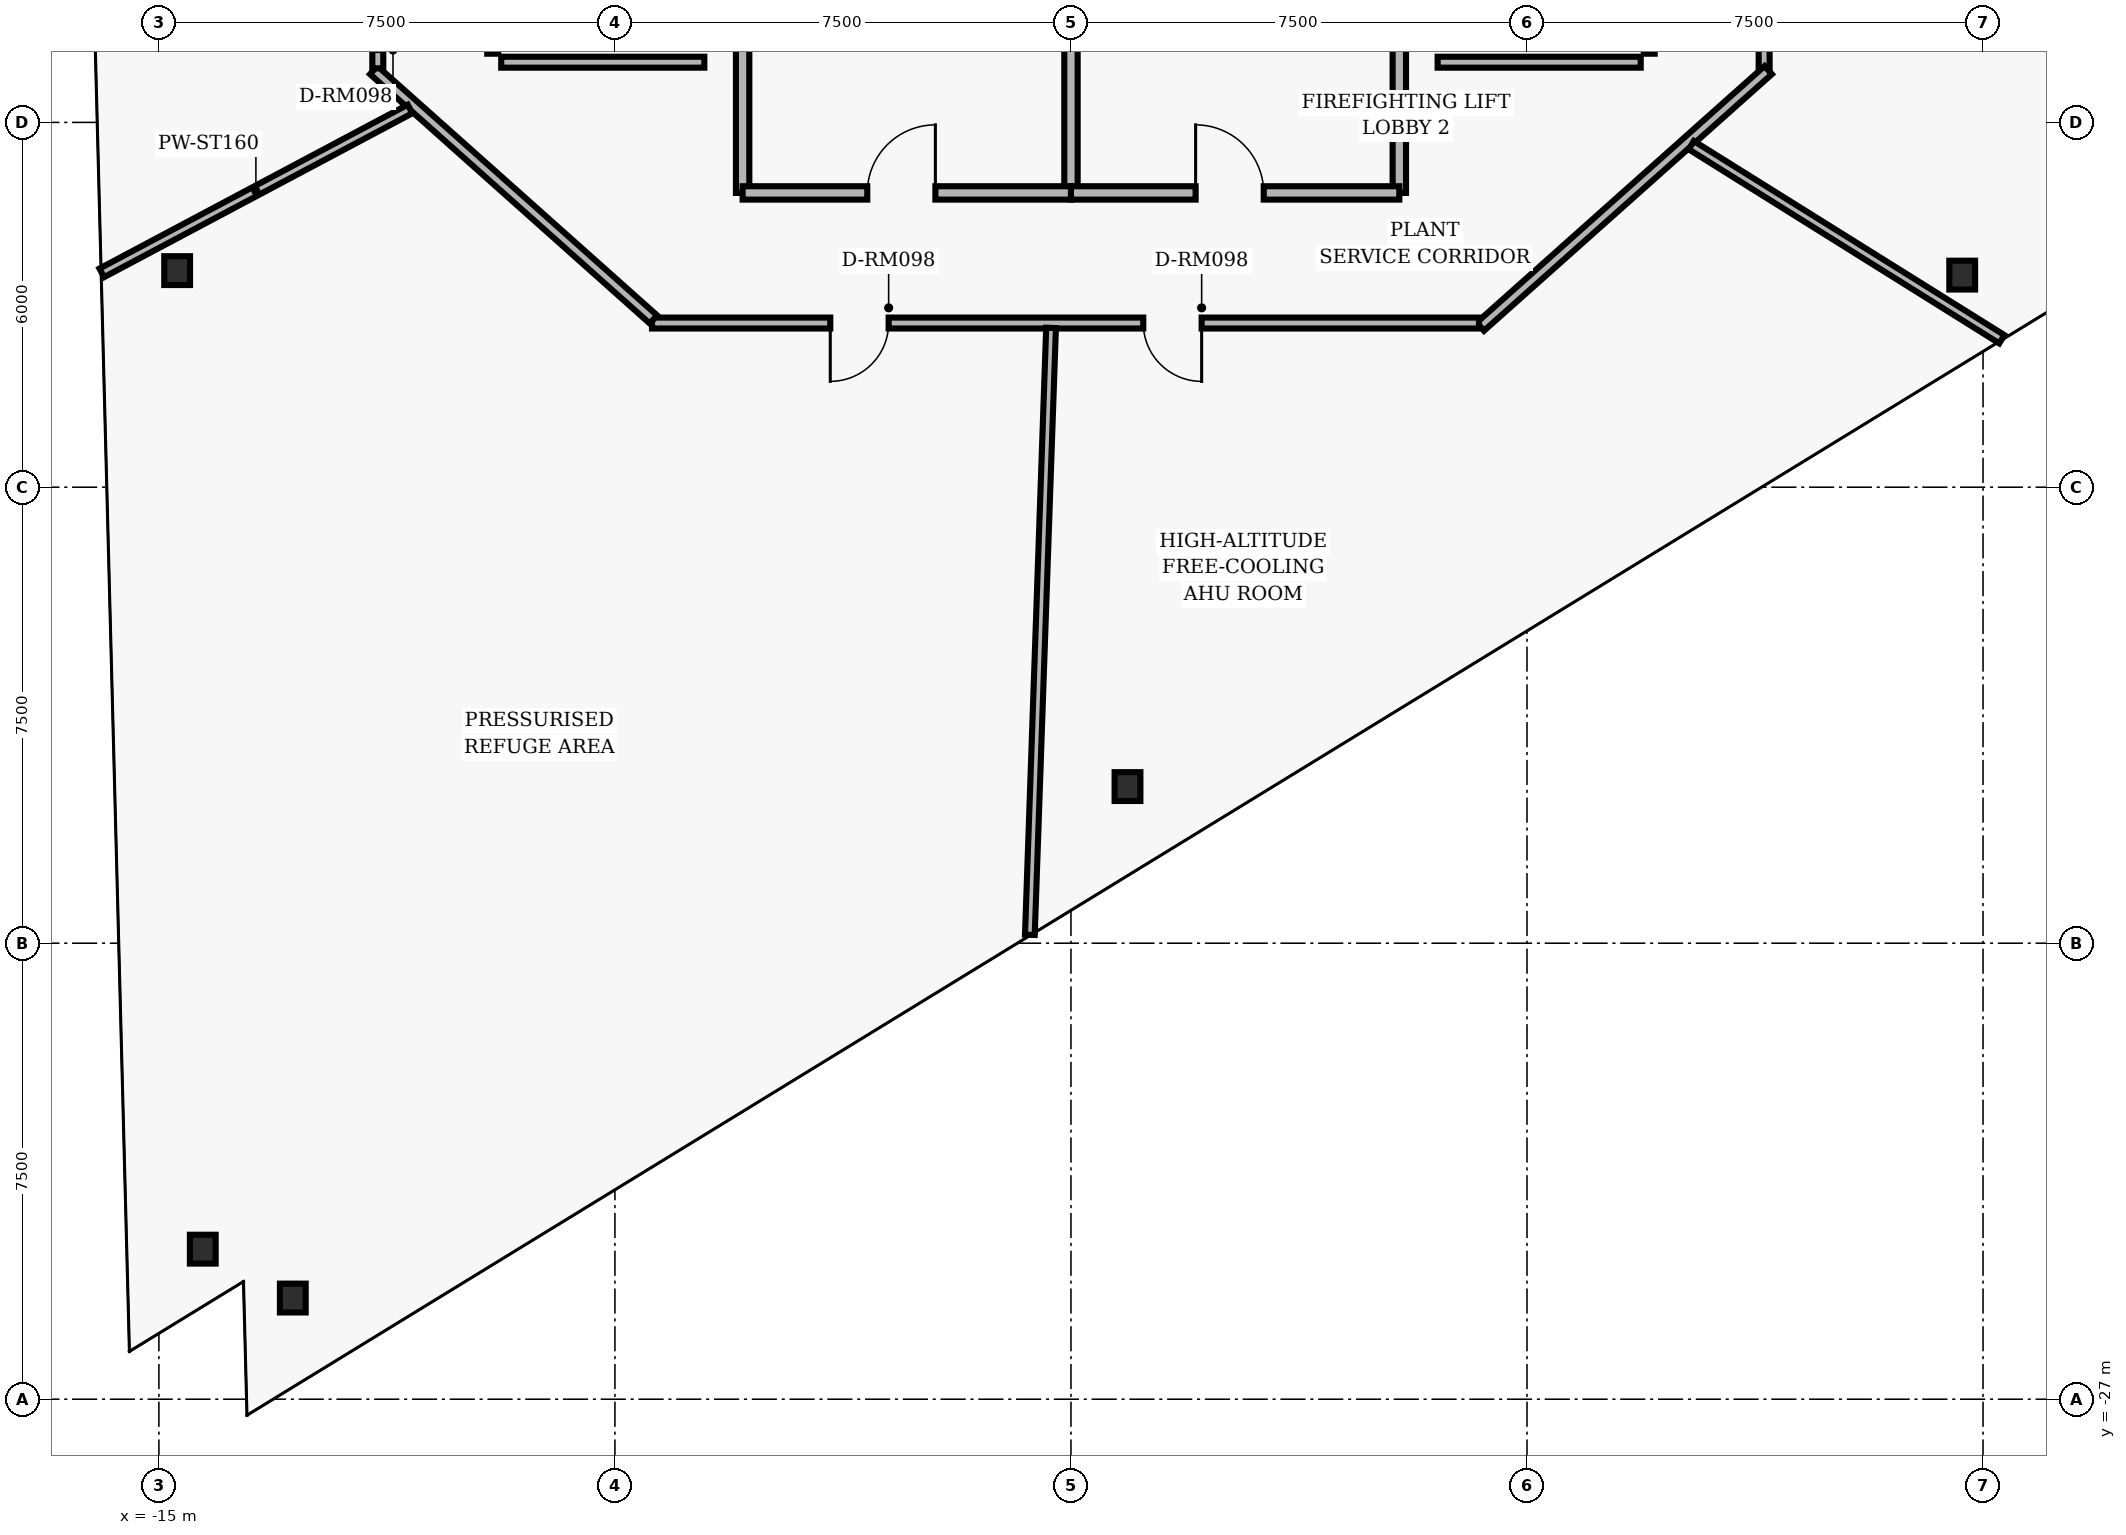
"""IFC4 building model, lengths in metres.
Left out: names, types, materials, properties, quantities, classifications, styles, units other than length and angle.
Written with IfcOpenShell. Run it as: python <this file> out.ifc"""

import sys

from ifc_helpers import new_model, si_unit, direction, frame, frame_2d, origin, origin_2d, place, context, subcontext, project, spatial, rectangle, i_section, extrude, element, fill, save


model = new_model("IFC4")
c1 = context("Model", 3, precision=1e-05, world=origin(), true_north=direction((0.0, 1.0)))
c2 = subcontext(c1, "Body", "Model", "MODEL_VIEW")
j1 = project(units=[si_unit("LENGTHUNIT", "METRE"), si_unit("PLANEANGLEUNIT", "RADIAN")], contexts=[c1])
p1 = place(None, origin())
s1 = spatial("IfcSite", under=j1, at=p1, CompositionType="ELEMENT")
p2 = place(p1, origin())
s2 = spatial("IfcBuilding", under=s1, at=p2, CompositionType="ELEMENT")
p3 = place(p2, frame((0.0, 0.0, 45.76)))
s3 = spatial("IfcBuildingStorey", under=s2, at=p3, CompositionType="ELEMENT", Elevation=45.76)
for number, where, z_axis, x_axis in (
    (1, (-14.7, -8.438, 0.0), (0.0, 0.0, 1.0), (1.0, 0.0, 0.0)),
    (2, (-14.279, -24.532, 0.0), (0.0, 0.0, 1.0), (1.0, 0.0, 0.0)),
    (3, (-12.798, -25.336, 0.0), (0.0, 0.0, 1.0), (1.0, 0.0, 0.0)),
    (4, (0.93, -16.924, 0.0), (0.0, 0.0, 1.0), (1.0, 0.0, 0.0)),
    (5, (14.657, -8.512, 0.0), (0.0, 0.0, 1.0), (1.0, 0.0, 0.0)),
):
    element("IfcColumn", number, at=place(p3, frame(where, z_axis=z_axis, x_axis=x_axis)), inside=s3, PredefinedType="COLUMN", context=c2, shape_type="SweptSolid", body=[
        extrude(i_section(OverallWidth=0.424, OverallDepth=0.474, WebThickness=0.048, FlangeThickness=0.077, FilletRadius=0.025, at=origin_2d()), origin(), (0.0, 0.0, 1.0), 3.84),
    ])
for number, where, z_axis, x_axis in (
    (6, (-5.4, -7.16, 0.0), (0.0, 0.0, 1.0), (0.0, 1.0, 0.0)),
    (7, (5.4, -7.16, 0.0), (0.0, 0.0, 1.0), (0.0, 1.0, 0.0)),
):
    element("IfcWall", number, at=place(p3, frame(where, z_axis=z_axis, x_axis=x_axis)), inside=s3, PredefinedType="PARTITIONING", context=c2, shape_type="SweptSolid", body=[
        extrude(rectangle(XDim=2.71, YDim=0.22, at=frame_2d((1.355, 0.0))), origin(), (0.0, 0.0, 1.0), 3.393),
    ])
p4 = place(p3, frame((0.0, -7.16, 0.0), z_axis=(0.0, 0.0, 1.0), x_axis=(0.0, 1.0, 0.0)))
e8 = element("IfcWall", 8, at=p4, inside=s3, PredefinedType="PARTITIONING", context=c2, shape_type="SweptSolid", body=[
    extrude(rectangle(XDim=2.81, YDim=0.22, at=frame_2d((1.405, 0.0))), origin(), (0.0, 0.0, 1.0), 3.393),
])
p5 = place(p3, frame((-5.4, -7.16, 0.0), z_axis=(0.0, 0.0, 1.0), x_axis=(1.0, 0.0, 0.0)))
e9 = element("IfcWall", 9, at=p5, inside=s3, PredefinedType="PARTITIONING", context=c2, shape_type="SweptSolid", body=[
    extrude(rectangle(XDim=5.4, YDim=0.22, at=frame_2d((2.7, 0.0))), origin(), (0.0, 0.0, 1.0), 3.393),
])
p6 = place(p5, frame((2.05, 0.0, 0.0)))
e10 = element("IfcOpeningElement", 10, at=p6, cuts=e9, PredefinedType="OPENING", context=c2, shape_type="SweptSolid", body=[
    extrude(rectangle(XDim=1.12, YDim=2.02, at=frame_2d((0.56, 1.01))), frame((0.0, 0.12, 0.0), z_axis=(0.0, -1.0, 0.0), x_axis=(1.0, 0.0, 0.0)), (0.0, 0.0, 1.0), 0.24),
])
p7 = place(p3, frame((0.0, -7.16, 0.0), z_axis=(0.0, 0.0, 1.0), x_axis=(1.0, 0.0, 0.0)))
e11 = element("IfcWall", 11, at=p7, inside=s3, PredefinedType="PARTITIONING", context=c2, shape_type="SweptSolid", body=[
    extrude(rectangle(XDim=5.4, YDim=0.22, at=frame_2d((2.7, 0.0))), origin(), (0.0, 0.0, 1.0), 3.393),
])
p8 = place(p7, frame((2.05, 0.0, 0.0)))
e12 = element("IfcOpeningElement", 12, at=p8, cuts=e11, PredefinedType="OPENING", context=c2, shape_type="SweptSolid", body=[
    extrude(rectangle(XDim=1.12, YDim=2.02, at=frame_2d((0.56, 1.01))), frame((0.0, 0.12, 0.0), z_axis=(0.0, -1.0, 0.0), x_axis=(1.0, 0.0, 0.0)), (0.0, 0.0, 1.0), 0.24),
])
p9 = place(p3, frame((11.4, 5.11, 0.0), z_axis=(0.0, 0.0, 1.0), x_axis=(0.0, -1.0, 0.0)))
e13 = element("IfcWall", 13, at=p9, inside=s3, PredefinedType="PARTITIONING", context=c2, shape_type="SweptSolid", body=[
    extrude(rectangle(XDim=10.22, YDim=0.18, at=frame_2d((5.11, 0.0))), origin(), (0.0, 0.0, 1.0), 3.393),
])
p10 = place(p9, frame((4.63, 0.0, 0.0)))
e14 = element("IfcOpeningElement", 14, at=p10, cuts=e13, PredefinedType="OPENING", context=c2, shape_type="SweptSolid", body=[
    extrude(rectangle(XDim=0.96, YDim=2.02, at=frame_2d((0.48, 1.01))), frame((0.0, 0.1, 0.0), z_axis=(0.0, -1.0, 0.0), x_axis=(1.0, 0.0, 0.0)), (0.0, 0.0, 1.0), 0.2),
])
p11 = place(p3, frame((11.467, -5.14, 0.0), z_axis=(0.0, 0.0, 1.0), x_axis=(-0.746516597114, -0.665366793756, 0.0)))
e15 = element("IfcWall", 15, at=p11, inside=s3, PredefinedType="PARTITIONING", context=c2, shape_type="SweptSolid", body=[
    extrude(rectangle(XDim=6.342, YDim=0.18, at=frame_2d((3.171, 0.0))), origin(), (0.0, 0.0, 1.0), 2.907),
])
p12 = place(p3, frame((6.71, -9.3, 0.0), z_axis=(0.0, 0.0, 1.0), x_axis=(-1.0, 0.0, 0.0)))
e16 = element("IfcWall", 16, at=p12, inside=s3, PredefinedType="PARTITIONING", context=c2, shape_type="SweptSolid", body=[
    extrude(rectangle(XDim=13.6, YDim=0.18, at=frame_2d((6.8, 0.0))), origin(), (0.0, 0.0, 1.0), 2.907),
])
p13 = place(p12, frame((9.708, 0.0, 0.0)))
e17 = element("IfcOpeningElement", 17, at=p13, cuts=e16, PredefinedType="OPENING", context=c2, shape_type="SweptSolid", body=[
    extrude(rectangle(XDim=0.96, YDim=2.02, at=frame_2d((0.48, 1.01))), frame((0.0, 0.1, 0.0), z_axis=(0.0, -1.0, 0.0), x_axis=(1.0, 0.0, 0.0)), (0.0, 0.0, 1.0), 0.2),
])
p14 = place(p12, frame((4.561, 0.0, 0.0)))
e18 = element("IfcOpeningElement", 18, at=p14, cuts=e16, PredefinedType="OPENING", context=c2, shape_type="SweptSolid", body=[
    extrude(rectangle(XDim=0.96, YDim=2.02, at=frame_2d((0.48, 1.01))), frame((0.0, 0.1, 0.0), z_axis=(0.0, -1.0, 0.0), x_axis=(1.0, 0.0, 0.0)), (0.0, 0.0, 1.0), 0.2),
])
p15 = place(p3, frame((-6.867, -9.24, 0.0), z_axis=(0.0, 0.0, 1.0), x_axis=(-0.746532095616, 0.665349404611, 0.0)))
e19 = element("IfcWall", 19, at=p15, inside=s3, PredefinedType="PARTITIONING", context=c2, shape_type="SweptSolid", body=[
    extrude(rectangle(XDim=6.162, YDim=0.18, at=frame_2d((3.081, 0.0))), origin(), (0.0, 0.0, 1.0), 3.393),
])
p16 = place(p3, frame((-11.4, -5.11, 0.0), z_axis=(0.0, 0.0, 1.0), x_axis=(0.0, 1.0, 0.0)))
e20 = element("IfcWall", 20, at=p16, inside=s3, PredefinedType="PARTITIONING", context=c2, shape_type="SweptSolid", body=[
    extrude(rectangle(XDim=10.22, YDim=0.18, at=frame_2d((5.11, 0.0))), origin(), (0.0, 0.0, 1.0), 3.393),
])
p17 = place(p16, frame((0.3, 0.0, 0.0)))
e21 = element("IfcOpeningElement", 21, at=p17, cuts=e20, PredefinedType="OPENING", context=c2, shape_type="SweptSolid", body=[
    extrude(rectangle(XDim=0.96, YDim=2.02, at=frame_2d((0.48, 1.01))), frame((0.0, 0.1, 0.0), z_axis=(0.0, -1.0, 0.0), x_axis=(1.0, 0.0, 0.0)), (0.0, 0.0, 1.0), 0.2),
])
p18 = place(p3, frame((-9.51, 4.87, 0.0), z_axis=(0.0, 0.0, 1.0), x_axis=(0.0, -1.0, 0.0)))
e22 = element("IfcWall", 22, at=p18, inside=s3, PredefinedType="PARTITIONING", context=c2, shape_type="SweptSolid", body=[
    extrude(rectangle(XDim=9.74, YDim=0.18, at=frame_2d((4.87, 0.0))), origin(), (0.0, 0.0, 1.0), 2.6),
])
for number, where, z_axis, x_axis in (
    (23, (-9.37, -5.01, 0.0), (0.0, 0.0, 1.0), (1.0, 0.0, 0.0)),
    (24, (6.03, -5.01, 0.0), (0.0, 0.0, 1.0), (1.0, 0.0, 0.0)),
):
    element("IfcWall", number, at=place(p3, frame(where, z_axis=z_axis, x_axis=x_axis)), inside=s3, PredefinedType="PARTITIONING", context=c2, shape_type="SweptSolid", body=[
        extrude(rectangle(XDim=3.34, YDim=0.18, at=frame_2d((1.67, 0.0))), origin(), (0.0, 0.0, 1.0), 3.393),
    ])
p19 = place(p3, frame((9.51, -4.87, 0.0), z_axis=(0.0, 0.0, 1.0), x_axis=(0.0, 1.0, 0.0)))
e25 = element("IfcWall", 25, at=p19, inside=s3, PredefinedType="PARTITIONING", context=c2, shape_type="SweptSolid", body=[
    extrude(rectangle(XDim=9.74, YDim=0.18, at=frame_2d((4.87, 0.0))), origin(), (0.0, 0.0, 1.0), 3.393),
])
p20 = place(p3, frame((-10.87, -5.78, 0.0), z_axis=(0.0, 0.0, 1.0), x_axis=(-0.88294664721, -0.469473341288, 0.0)))
e26 = element("IfcWall", 26, at=p20, inside=s3, PredefinedType="PARTITIONING", context=c2, shape_type="SweptSolid", body=[
    extrude(rectangle(XDim=5.742, YDim=0.16, at=frame_2d((2.871, 0.0))), origin(), (0.0, 0.0, 1.0), 2.6),
])
p21 = place(p3, frame((-0.328, -9.38, 0.0), z_axis=(0.0, 0.0, 1.0), x_axis=(-0.034878979951, -0.999391543269, 0.0)))
e27 = element("IfcWall", 27, at=p21, inside=s3, PredefinedType="PARTITIONING", context=c2, shape_type="SweptSolid", body=[
    extrude(rectangle(XDim=9.989, YDim=0.16, at=frame_2d((4.994, 0.0))), origin(), (0.0, 0.0, 1.0), 3.393),
])
p22 = place(p3, frame((10.202, -6.375, 0.0), z_axis=(0.0, 0.0, 1.0), x_axis=(0.848052957344, -0.529911484627, 0.0)))
e28 = element("IfcWall", 28, at=p22, inside=s3, PredefinedType="PARTITIONING", context=c2, shape_type="SweptSolid", body=[
    extrude(rectangle(XDim=6.022, YDim=0.16, at=frame_2d((3.011, 0.0))), origin(), (0.0, 0.0, 1.0), 3.393),
])
p23 = place(p6, origin())
e29 = element("IfcDoor", 29, at=p23, inside=s3, OperationType="SINGLE_SWING_RIGHT", PredefinedType="DOOR", context=c2, shape_type="SweptSolid", body=[
    extrude(rectangle(XDim=1.12, YDim=2.02, at=frame_2d((0.56, 1.01))), frame((0.0, 0.025, 0.0), z_axis=(0.0, -1.0, 0.0), x_axis=(1.0, 0.0, 0.0)), (0.0, 0.0, 1.0), 0.05),
])
fill(e10, e29)
p24 = place(p8, origin())
e30 = element("IfcDoor", 30, at=p24, inside=s3, OperationType="SINGLE_SWING_LEFT", PredefinedType="DOOR", context=c2, shape_type="SweptSolid", body=[
    extrude(rectangle(XDim=1.12, YDim=2.02, at=frame_2d((0.56, 1.01))), frame((0.0, 0.025, 0.0), z_axis=(0.0, -1.0, 0.0), x_axis=(1.0, 0.0, 0.0)), (0.0, 0.0, 1.0), 0.05),
])
fill(e12, e30)
p25 = place(p13, origin())
e31 = element("IfcDoor", 31, at=p25, inside=s3, OperationType="SINGLE_SWING_RIGHT", PredefinedType="DOOR", context=c2, shape_type="SweptSolid", body=[
    extrude(rectangle(XDim=0.96, YDim=2.02, at=frame_2d((0.48, 1.01))), frame((0.0, 0.025, 0.0), z_axis=(0.0, -1.0, 0.0), x_axis=(1.0, 0.0, 0.0)), (0.0, 0.0, 1.0), 0.05),
])
fill(e17, e31)
p26 = place(p14, origin())
e32 = element("IfcDoor", 32, at=p26, inside=s3, OperationType="SINGLE_SWING_LEFT", PredefinedType="DOOR", context=c2, shape_type="SweptSolid", body=[
    extrude(rectangle(XDim=0.96, YDim=2.02, at=frame_2d((0.48, 1.01))), frame((0.0, 0.025, 0.0), z_axis=(0.0, -1.0, 0.0), x_axis=(1.0, 0.0, 0.0)), (0.0, 0.0, 1.0), 0.05),
])
fill(e18, e32)
save(model, sys.argv[1])
